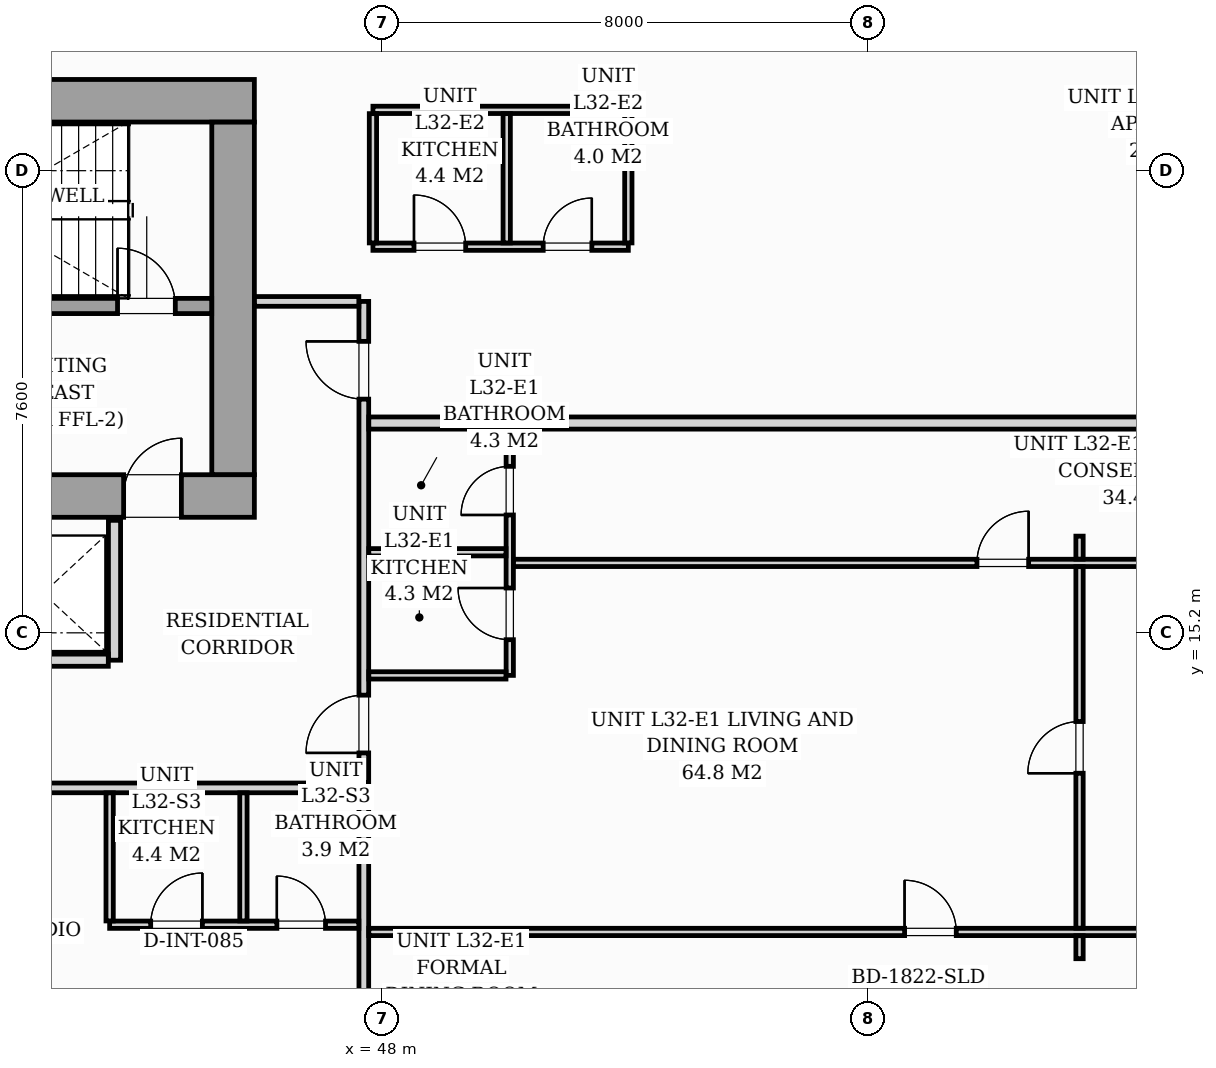
"""IFC4 building model, lengths in metres.
Left out: names, types, materials, properties, quantities, classifications, styles, units other than length and angle.
Written with IfcOpenShell. Run it as: python <this file> out.ifc"""

import sys

from ifc_helpers import new_model, si_unit, direction, frame, frame_2d, origin, origin_2d, place, context, subcontext, project, spatial, rectangle, i_section, extrude, source, transform, mapped, element, fill, save


model = new_model("IFC4")
c1 = context("Model", 3, precision=1e-05, world=origin(), true_north=direction((0.0, 1.0)))
c2 = subcontext(c1, "Body", "Model", "MODEL_VIEW")
j1 = project(units=[si_unit("LENGTHUNIT", "METRE"), si_unit("PLANEANGLEUNIT", "RADIAN")], contexts=[c1])
p1 = place(None, origin())
s1 = spatial("IfcSite", under=j1, at=p1, CompositionType="ELEMENT")
p2 = place(p1, origin())
s2 = spatial("IfcBuilding", under=s1, at=p2, CompositionType="ELEMENT")
p3 = place(p2, frame((0.0, 0.0, 113.0)))
s3 = spatial("IfcBuildingStorey", under=s2, at=p3, CompositionType="ELEMENT", Elevation=113.0)
m1 = source(origin(), c2, "Body", "SweptSolid", [
    extrude(i_section(OverallWidth=0.427, OverallDepth=0.483, WebThickness=0.051, FlangeThickness=0.082, FilletRadius=0.018, at=origin_2d()), origin(), (0.0, 0.0, 1.0), 3.196),
])
for number, where, z_axis, x_axis in (
    (1, (45.6, 17.4, 0.002), (0.0, 0.0, 1.0), (1.0, 0.0, 0.0)),
    (2, (45.6, 24.0, 0.002), (0.0, 0.0, 1.0), (1.0, 0.0, 0.0)),
):
    element("IfcColumn", number, at=place(p3, frame(where, z_axis=z_axis, x_axis=x_axis)), inside=s3, PredefinedType="PILASTER", context=c2, shape_type="MappedRepresentation", body=[
        mapped(m1, transform((0.0, 0.0, 0.0), scale=1.0)),
    ])
m2 = source(origin(), c2, "Body", "SweptSolid", [
    extrude(rectangle(XDim=0.9, YDim=1.1, at=origin_2d()), origin(), (0.0, 0.0, 1.0), 3.196),
])
p4 = place(p3, frame((53.085, 8.776, 0.002), z_axis=(0.0, 0.0, 1.0), x_axis=(0.995396198367, 0.09584575252, 0.0)))
e3 = element("IfcColumn", 3, at=p4, inside=s3, PredefinedType="COLUMN", context=c2, shape_type="MappedRepresentation", body=[
    mapped(m2, transform((0.0, 0.0, 0.0), scale=1.0)),
])
p5 = place(p3, frame((26.1, 17.45, 0.0), z_axis=(0.0, 0.0, 1.0), x_axis=(1.0, 0.0, 0.0)))
e4 = element("IfcWall", 4, at=p5, inside=s3, PredefinedType="SHEAR", context=c2, shape_type="SweptSolid", body=[
    extrude(rectangle(XDim=19.8, YDim=0.7, at=frame_2d((9.9, 0.0))), origin(), (0.0, 0.0, 1.0), 3.2),
])
p6 = place(p5, frame((1.05, 0.0, 0.0)))
e5 = element("IfcOpeningElement", 5, at=p6, cuts=e4, PredefinedType="OPENING", context=c2, shape_type="SweptSolid", body=[
    extrude(rectangle(XDim=0.95, YDim=2.06, at=frame_2d((0.475, 1.03))), frame((0.0, 0.36, 0.0), z_axis=(0.0, -1.0, 0.0), x_axis=(1.0, 0.0, 0.0)), (0.0, 0.0, 1.0), 0.72),
])
p7 = place(p5, frame((9.48, 0.0, 0.0)))
e6 = element("IfcOpeningElement", 6, at=p7, cuts=e4, PredefinedType="OPENING", context=c2, shape_type="SweptSolid", body=[
    extrude(rectangle(XDim=0.85, YDim=2.0, at=frame_2d((0.425, 1.0))), frame((0.0, 0.36, 0.0), z_axis=(0.0, -1.0, 0.0), x_axis=(1.0, 0.0, 0.0)), (0.0, 0.0, 1.0), 0.72),
])
p8 = place(p5, frame((17.65, 0.0, 0.0)))
e7 = element("IfcOpeningElement", 7, at=p8, cuts=e4, PredefinedType="OPENING", context=c2, shape_type="SweptSolid", body=[
    extrude(rectangle(XDim=0.95, YDim=2.06, at=frame_2d((0.475, 1.03))), frame((0.0, 0.36, 0.0), z_axis=(0.0, -1.0, 0.0), x_axis=(1.0, 0.0, 0.0)), (0.0, 0.0, 1.0), 0.72),
])
p9 = place(p3, frame((26.1, 23.95, 0.0), z_axis=(0.0, 0.0, 1.0), x_axis=(1.0, 0.0, 0.0)))
e8 = element("IfcWall", 8, at=p9, inside=s3, PredefinedType="SHEAR", context=c2, shape_type="SweptSolid", body=[
    extrude(rectangle(XDim=19.8, YDim=0.7, at=frame_2d((9.9, 0.0))), origin(), (0.0, 0.0, 1.0), 3.2),
])
p10 = place(p3, frame((45.55, 17.802, 0.0), z_axis=(0.0, 0.0, 1.0), x_axis=(0.0, 1.0, 0.0)))
e9 = element("IfcWall", 9, at=p10, inside=s3, PredefinedType="SHEAR", context=c2, shape_type="SweptSolid", body=[
    extrude(rectangle(XDim=5.796, YDim=0.7, at=frame_2d((2.898, 0.0))), origin(), (0.0, 0.0, 1.0), 3.2),
])
p11 = place(p3, frame((37.05, 20.575, 0.0), z_axis=(0.0, 0.0, 1.0), x_axis=(1.0, 0.0, 0.0)))
e10 = element("IfcWall", 10, at=p11, inside=s3, PredefinedType="SOLIDWALL", context=c2, shape_type="SweptSolid", body=[
    extrude(rectangle(XDim=8.148, YDim=0.25, at=frame_2d((4.074, 0.0))), origin(), (0.0, 0.0, 1.0), 3.2),
])
p12 = place(p11, frame((6.6, 0.0, 0.0)))
e11 = element("IfcOpeningElement", 11, at=p12, cuts=e10, PredefinedType="OPENING", context=c2, shape_type="SweptSolid", body=[
    extrude(rectangle(XDim=0.95, YDim=2.06, at=frame_2d((0.475, 1.03))), frame((0.0, 0.135, 0.0), z_axis=(0.0, -1.0, 0.0), x_axis=(1.0, 0.0, 0.0)), (0.0, 0.0, 1.0), 0.27),
])
p13 = place(p3, frame((43.6, 14.75, 0.0), z_axis=(0.0, 0.0, 1.0), x_axis=(0.0, 1.0, 0.0)))
e12 = element("IfcWall", 12, at=p13, inside=s3, PredefinedType="PARTITIONING", context=c2, shape_type="SweptSolid", body=[
    extrude(rectangle(XDim=2.3, YDim=0.2, at=frame_2d((1.15, 0.0))), origin(), (0.0, 0.0, 1.0), 2.94),
])
p14 = place(p3, frame((41.352, 14.75, 0.0), z_axis=(0.0, 0.0, 1.0), x_axis=(1.0, 0.0, 0.0)))
e13 = element("IfcWall", 13, at=p14, inside=s3, PredefinedType="PARTITIONING", context=c2, shape_type="SweptSolid", body=[
    extrude(rectangle(XDim=2.146, YDim=0.2, at=frame_2d((1.073, 0.0))), origin(), (0.0, 0.0, 1.0), 2.94),
])
p15 = place(p3, frame((21.5, 12.65, 0.0), z_axis=(0.0, 0.0, 1.0), x_axis=(1.0, 0.0, 0.0)))
e14 = element("IfcWall", 14, at=p15, inside=s3, PredefinedType="PARTITIONING", context=c2, shape_type="SweptSolid", body=[
    extrude(rectangle(XDim=26.2, YDim=0.16, at=frame_2d((13.1, 0.0))), origin(), (0.0, 0.0, 1.0), 2.94),
])
p16 = place(p15, frame((5.927, 0.0, 0.0)))
e15 = element("IfcOpeningElement", 15, at=p16, cuts=e14, PredefinedType="OPENING", context=c2, shape_type="SweptSolid", body=[
    extrude(rectangle(XDim=0.95, YDim=2.06, at=frame_2d((0.475, 1.03))), frame((0.0, 0.09, 0.0), z_axis=(0.0, -1.0, 0.0), x_axis=(1.0, 0.0, 0.0)), (0.0, 0.0, 1.0), 0.18),
])
p17 = place(p15, frame((10.575, 0.0, 0.0)))
e16 = element("IfcOpeningElement", 16, at=p17, cuts=e14, PredefinedType="OPENING", context=c2, shape_type="SweptSolid", body=[
    extrude(rectangle(XDim=0.95, YDim=2.06, at=frame_2d((0.475, 1.03))), frame((0.0, 0.09, 0.0), z_axis=(0.0, -1.0, 0.0), x_axis=(1.0, 0.0, 0.0)), (0.0, 0.0, 1.0), 0.18),
])
p18 = place(p15, frame((19.322, 0.0, 0.0)))
e17 = element("IfcOpeningElement", 17, at=p18, cuts=e14, PredefinedType="OPENING", context=c2, shape_type="SweptSolid", body=[
    extrude(rectangle(XDim=0.95, YDim=2.06, at=frame_2d((0.475, 1.03))), frame((0.0, 0.09, 0.0), z_axis=(0.0, -1.0, 0.0), x_axis=(1.0, 0.0, 0.0)), (0.0, 0.0, 1.0), 0.18),
])
p19 = place(p3, frame((47.7, 7.153, 0.0), z_axis=(0.0, 0.0, 1.0), x_axis=(0.0, 1.0, 0.0)))
e18 = element("IfcWall", 18, at=p19, inside=s3, PredefinedType="PARTITIONING", context=c2, shape_type="SweptSolid", body=[
    extrude(rectangle(XDim=5.416, YDim=0.16, at=frame_2d((2.708, 0.0))), origin(), (0.0, 0.0, 1.0), 2.94),
])
p20 = place(p3, frame((47.7, 12.732, 0.0), z_axis=(0.0, 0.0, 1.0), x_axis=(0.0, 1.0, 0.0)))
e19 = element("IfcWall", 19, at=p20, inside=s3, PredefinedType="PARTITIONING", context=c2, shape_type="SweptSolid", body=[
    extrude(rectangle(XDim=7.918, YDim=0.16, at=frame_2d((3.959, 0.0))), origin(), (0.0, 0.0, 1.0), 2.94),
])
p21 = place(p20, frame((0.493, 0.0, 0.0)))
e20 = element("IfcOpeningElement", 20, at=p21, cuts=e19, PredefinedType="OPENING", context=c2, shape_type="SweptSolid", body=[
    extrude(rectangle(XDim=0.95, YDim=2.06, at=frame_2d((0.475, 1.03))), frame((0.0, 0.09, 0.0), z_axis=(0.0, -1.0, 0.0), x_axis=(1.0, 0.0, 0.0)), (0.0, 0.0, 1.0), 0.18),
])
p22 = place(p20, frame((6.311, 0.0, 0.0)))
e21 = element("IfcOpeningElement", 21, at=p22, cuts=e19, PredefinedType="OPENING", context=c2, shape_type="SweptSolid", body=[
    extrude(rectangle(XDim=0.95, YDim=2.06, at=frame_2d((0.475, 1.03))), frame((0.0, 0.09, 0.0), z_axis=(0.0, -1.0, 0.0), x_axis=(1.0, 0.0, 0.0)), (0.0, 0.0, 1.0), 0.18),
])
p23 = place(p3, frame((45.902, 20.65, 0.0), z_axis=(0.0, 0.0, 1.0), x_axis=(1.0, 0.0, 0.0)))
e22 = element("IfcWall", 22, at=p23, inside=s3, PredefinedType="PARTITIONING", context=c2, shape_type="SweptSolid", body=[
    extrude(rectangle(XDim=1.716, YDim=0.16, at=frame_2d((0.858, 0.0))), origin(), (0.0, 0.0, 1.0), 2.94),
])
p24 = place(p3, frame((43.52, 10.4, 0.0), z_axis=(0.0, 0.0, 1.0), x_axis=(1.0, 0.0, 0.0)))
e23 = element("IfcWall", 23, at=p24, inside=s3, PredefinedType="PARTITIONING", context=c2, shape_type="SweptSolid", body=[
    extrude(rectangle(XDim=4.098, YDim=0.12, at=frame_2d((2.049, 0.0))), origin(), (0.0, 0.0, 1.0), 2.94),
])
p25 = place(p24, frame((0.675, 0.0, 0.0)))
e24 = element("IfcOpeningElement", 24, at=p25, cuts=e23, PredefinedType="OPENING", context=c2, shape_type="SweptSolid", body=[
    extrude(rectangle(XDim=0.85, YDim=2.05, at=frame_2d((0.425, 1.025))), frame((0.0, 0.07, 0.0), z_axis=(0.0, -1.0, 0.0), x_axis=(1.0, 0.0, 0.0)), (0.0, 0.0, 1.0), 0.14),
])
p26 = place(p24, frame((2.75, 0.0, 0.0)))
e25 = element("IfcOpeningElement", 25, at=p26, cuts=e23, PredefinedType="OPENING", context=c2, shape_type="SweptSolid", body=[
    extrude(rectangle(XDim=0.8, YDim=2.02, at=frame_2d((0.4, 1.01))), frame((0.0, 0.07, 0.0), z_axis=(0.0, -1.0, 0.0), x_axis=(1.0, 0.0, 0.0)), (0.0, 0.0, 1.0), 0.14),
])
for number, where, z_axis, x_axis in (
    (26, (43.52, 10.462, 0.0), (0.0, 0.0, 1.0), (0.0, 1.0, 0.0)),
    (27, (45.72, 10.462, 0.0), (0.0, 0.0, 1.0), (0.0, 1.0, 0.0)),
):
    element("IfcWall", number, at=place(p3, frame(where, z_axis=z_axis, x_axis=x_axis)), inside=s3, PredefinedType="PARTITIONING", context=c2, shape_type="SweptSolid", body=[
        extrude(rectangle(XDim=2.106, YDim=0.12, at=frame_2d((1.053, 0.0))), origin(), (0.0, 0.0, 1.0), 2.94),
    ])
p27 = place(p3, frame((47.782, 18.65, 0.0), z_axis=(0.0, 0.0, 1.0), x_axis=(1.0, 0.0, 0.0)))
e28 = element("IfcWall", 28, at=p27, inside=s3, PredefinedType="PARTITIONING", context=c2, shape_type="SweptSolid", body=[
    extrude(rectangle(XDim=21.049, YDim=0.2, at=frame_2d((10.525, 0.0))), origin(), (0.0, 0.0, 1.0), 2.063),
])
p28 = place(p3, frame((50.1, 14.5, 0.0), z_axis=(0.0, 0.0, 1.0), x_axis=(0.0, 1.0, 0.0)))
e29 = element("IfcWall", 29, at=p28, inside=s3, PredefinedType="PARTITIONING", context=c2, shape_type="SweptSolid", body=[
    extrude(rectangle(XDim=4.048, YDim=0.12, at=frame_2d((2.024, 0.0))), origin(), (0.0, 0.0, 1.0), 2.94),
])
p29 = place(p28, frame((0.587, 0.0, 0.0)))
e30 = element("IfcOpeningElement", 30, at=p29, cuts=e29, PredefinedType="OPENING", context=c2, shape_type="SweptSolid", body=[
    extrude(rectangle(XDim=0.85, YDim=2.05, at=frame_2d((0.425, 1.025))), frame((0.0, 0.07, 0.0), z_axis=(0.0, -1.0, 0.0), x_axis=(1.0, 0.0, 0.0)), (0.0, 0.0, 1.0), 0.14),
])
p30 = place(p28, frame((2.638, 0.0, 0.0)))
e31 = element("IfcOpeningElement", 31, at=p30, cuts=e29, PredefinedType="OPENING", context=c2, shape_type="SweptSolid", body=[
    extrude(rectangle(XDim=0.8, YDim=2.02, at=frame_2d((0.4, 1.01))), frame((0.0, 0.07, 0.0), z_axis=(0.0, -1.0, 0.0), x_axis=(1.0, 0.0, 0.0)), (0.0, 0.0, 1.0), 0.14),
])
for number, where, z_axis, x_axis in (
    (32, (47.782, 16.525, 0.0), (0.0, 0.0, 1.0), (1.0, 0.0, 0.0)),
    (33, (47.782, 14.5, 0.0), (0.0, 0.0, 1.0), (1.0, 0.0, 0.0)),
):
    element("IfcWall", number, at=place(p3, frame(where, z_axis=z_axis, x_axis=x_axis)), inside=s3, PredefinedType="PARTITIONING", context=c2, shape_type="SweptSolid", body=[
        extrude(rectangle(XDim=2.256, YDim=0.12, at=frame_2d((1.128, 0.0))), origin(), (0.0, 0.0, 1.0), 2.94),
    ])
p31 = place(p3, frame((47.782, 10.281, 0.0), z_axis=(0.0, 0.0, 1.0), x_axis=(1.0, 0.0, 0.0)))
e34 = element("IfcWall", 34, at=p31, inside=s3, PredefinedType="PARTITIONING", context=c2, shape_type="SweptSolid", body=[
    extrude(rectangle(XDim=18.472, YDim=0.12, at=frame_2d((9.236, 0.0))), origin(), (0.0, 0.0, 1.0), 2.94),
])
p32 = place(p31, frame((8.811, 0.0, 0.0)))
e35 = element("IfcOpeningElement", 35, at=p32, cuts=e34, PredefinedType="OPENING", context=c2, shape_type="SweptSolid", body=[
    extrude(rectangle(XDim=0.85, YDim=2.05, at=frame_2d((0.425, 1.025))), frame((0.0, 0.07, 0.0), z_axis=(0.0, -1.0, 0.0), x_axis=(1.0, 0.0, 0.0)), (0.0, 0.0, 1.0), 0.14),
])
p33 = place(p3, frame((50.162, 16.35, 0.0), z_axis=(0.0, 0.0, 1.0), x_axis=(1.0, 0.0, 0.0)))
e36 = element("IfcWall", 36, at=p33, inside=s3, PredefinedType="PARTITIONING", context=c2, shape_type="SweptSolid", body=[
    extrude(rectangle(XDim=16.092, YDim=0.12, at=frame_2d((8.046, 0.0))), origin(), (0.0, 0.0, 1.0), 2.94),
])
p34 = place(p33, frame((7.621, 0.0, 0.0)))
e37 = element("IfcOpeningElement", 37, at=p34, cuts=e36, PredefinedType="OPENING", context=c2, shape_type="SweptSolid", body=[
    extrude(rectangle(XDim=0.85, YDim=2.05, at=frame_2d((0.425, 1.025))), frame((0.0, 0.07, 0.0), z_axis=(0.0, -1.0, 0.0), x_axis=(1.0, 0.0, 0.0)), (0.0, 0.0, 1.0), 0.14),
])
p35 = place(p3, frame((59.47, 9.841, 0.0), z_axis=(0.0, 0.0, 1.0), x_axis=(0.0, 1.0, 0.0)))
e38 = element("IfcWall", 38, at=p35, inside=s3, PredefinedType="PARTITIONING", context=c2, shape_type="SweptSolid", body=[
    extrude(rectangle(XDim=0.378, YDim=0.12, at=frame_2d((0.189, 0.0))), origin(), (0.0, 0.0, 1.0), 2.94),
])
p36 = place(p3, frame((59.47, 10.343, 0.0), z_axis=(0.0, 0.0, 1.0), x_axis=(0.0, 1.0, 0.0)))
e39 = element("IfcWall", 39, at=p36, inside=s3, PredefinedType="PARTITIONING", context=c2, shape_type="SweptSolid", body=[
    extrude(rectangle(XDim=5.945, YDim=0.12, at=frame_2d((2.973, 0.0))), origin(), (0.0, 0.0, 1.0), 2.94),
])
p37 = place(p36, frame((2.548, 0.0, 0.0)))
e40 = element("IfcOpeningElement", 40, at=p37, cuts=e39, PredefinedType="OPENING", context=c2, shape_type="SweptSolid", body=[
    extrude(rectangle(XDim=0.85, YDim=2.05, at=frame_2d((0.425, 1.025))), frame((0.0, 0.07, 0.0), z_axis=(0.0, -1.0, 0.0), x_axis=(1.0, 0.0, 0.0)), (0.0, 0.0, 1.0), 0.14),
])
p38 = place(p3, frame((59.47, 16.412, 0.0), z_axis=(0.0, 0.0, 1.0), x_axis=(0.0, 1.0, 0.0)))
e41 = element("IfcWall", 41, at=p38, inside=s3, PredefinedType="PARTITIONING", context=c2, shape_type="SweptSolid", body=[
    extrude(rectangle(XDim=0.378, YDim=0.12, at=frame_2d((0.189, 0.0))), origin(), (0.0, 0.0, 1.0), 2.94),
])
p39 = place(p3, frame((47.85, 21.55, 0.0), z_axis=(0.0, 0.0, 1.0), x_axis=(1.0, 0.0, 0.0)))
e42 = element("IfcWall", 42, at=p39, inside=s3, PredefinedType="PARTITIONING", context=c2, shape_type="SweptSolid", body=[
    extrude(rectangle(XDim=4.2, YDim=0.12, at=frame_2d((2.1, 0.0))), origin(), (0.0, 0.0, 1.0), 2.94),
])
p40 = place(p39, frame((0.675, 0.0, 0.0)))
e43 = element("IfcOpeningElement", 43, at=p40, cuts=e42, PredefinedType="OPENING", context=c2, shape_type="SweptSolid", body=[
    extrude(rectangle(XDim=0.85, YDim=2.05, at=frame_2d((0.425, 1.025))), frame((0.0, 0.07, 0.0), z_axis=(0.0, -1.0, 0.0), x_axis=(1.0, 0.0, 0.0)), (0.0, 0.0, 1.0), 0.14),
])
p41 = place(p39, frame((2.8, 0.0, 0.0)))
e44 = element("IfcOpeningElement", 44, at=p41, cuts=e42, PredefinedType="OPENING", context=c2, shape_type="SweptSolid", body=[
    extrude(rectangle(XDim=0.8, YDim=2.02, at=frame_2d((0.4, 1.01))), frame((0.0, 0.07, 0.0), z_axis=(0.0, -1.0, 0.0), x_axis=(1.0, 0.0, 0.0)), (0.0, 0.0, 1.0), 0.14),
])
p42 = place(p3, frame((47.85, 23.8, 0.0), z_axis=(0.0, 0.0, 1.0), x_axis=(1.0, 0.0, 0.0)))
e45 = element("IfcWall", 45, at=p42, inside=s3, PredefinedType="PARTITIONING", context=c2, shape_type="SweptSolid", body=[
    extrude(rectangle(XDim=4.2, YDim=0.12, at=frame_2d((2.1, 0.0))), origin(), (0.0, 0.0, 1.0), 2.94),
])
for number, where, z_axis, x_axis in (
    (46, (47.85, 21.612, 0.0), (0.0, 0.0, 1.0), (0.0, 1.0, 0.0)),
    (47, (50.05, 21.612, 0.0), (0.0, 0.0, 1.0), (0.0, 1.0, 0.0)),
    (48, (52.05, 21.612, 0.0), (0.0, 0.0, 1.0), (0.0, 1.0, 0.0)),
):
    element("IfcWall", number, at=place(p3, frame(where, z_axis=z_axis, x_axis=x_axis)), inside=s3, PredefinedType="PARTITIONING", context=c2, shape_type="SweptSolid", body=[
        extrude(rectangle(XDim=2.126, YDim=0.12, at=frame_2d((1.063, 0.0))), origin(), (0.0, 0.0, 1.0), 2.94),
    ])
m3 = source(origin(), c2, "Body", "SweptSolid", [
    extrude(rectangle(XDim=0.95, YDim=2.06, at=frame_2d((0.475, 1.03))), frame((0.0, 0.025, 0.0), z_axis=(0.0, -1.0, 0.0), x_axis=(1.0, 0.0, 0.0)), (0.0, 0.0, 1.0), 0.05),
])
p43 = place(p8, origin())
e49 = element("IfcDoor", 49, at=p43, inside=s3, OperationType="SINGLE_SWING_RIGHT", PredefinedType="DOOR", context=c2, shape_type="MappedRepresentation", body=[
    mapped(m3, transform((0.0, 0.0, 0.0), scale=1.0)),
])
fill(e7, e49)
p44 = place(p12, origin())
e50 = element("IfcDoor", 50, at=p44, inside=s3, OperationType="SINGLE_SWING_LEFT", PredefinedType="DOOR", context=c2, shape_type="MappedRepresentation", body=[
    mapped(m3, transform((0.0, 0.0, 0.0), scale=1.0)),
])
fill(e11, e50)
m4 = source(origin(), c2, "Body", "SweptSolid", [
    extrude(rectangle(XDim=0.85, YDim=2.05, at=frame_2d((0.425, 1.025))), frame((0.0, 0.025, 0.0), z_axis=(0.0, -1.0, 0.0), x_axis=(1.0, 0.0, 0.0)), (0.0, 0.0, 1.0), 0.05),
])
p45 = place(p25, origin())
e51 = element("IfcDoor", 51, at=p45, inside=s3, OperationType="SINGLE_SWING_RIGHT", PredefinedType="DOOR", context=c2, shape_type="MappedRepresentation", body=[
    mapped(m4, transform((0.0, 0.0, 0.0), scale=1.0)),
])
fill(e24, e51)
m5 = source(origin(), c2, "Body", "SweptSolid", [
    extrude(rectangle(XDim=0.8, YDim=2.02, at=frame_2d((0.4, 1.01))), frame((0.0, 0.025, 0.0), z_axis=(0.0, -1.0, 0.0), x_axis=(1.0, 0.0, 0.0)), (0.0, 0.0, 1.0), 0.05),
])
p46 = place(p26, origin())
e52 = element("IfcDoor", 52, at=p46, inside=s3, OperationType="SINGLE_SWING_LEFT", PredefinedType="DOOR", context=c2, shape_type="MappedRepresentation", body=[
    mapped(m5, transform((0.0, 0.0, 0.0), scale=1.0)),
])
fill(e25, e52)
m6 = source(origin(), c2, "Body", "SweptSolid", [
    extrude(rectangle(XDim=0.95, YDim=2.06, at=frame_2d((0.475, 1.03))), frame((0.0, 0.025, 0.0), z_axis=(0.0, -1.0, 0.0), x_axis=(1.0, 0.0, 0.0)), (0.0, 0.0, 1.0), 0.05),
])
p47 = place(p21, origin())
e53 = element("IfcDoor", 53, at=p47, inside=s3, OperationType="SINGLE_SWING_LEFT", PredefinedType="DOOR", context=c2, shape_type="MappedRepresentation", body=[
    mapped(m6, transform((0.0, 0.0, 0.0), scale=1.0)),
])
fill(e20, e53)
p48 = place(p29, origin())
e54 = element("IfcDoor", 54, at=p48, inside=s3, OperationType="SINGLE_SWING_RIGHT", PredefinedType="DOOR", context=c2, shape_type="MappedRepresentation", body=[
    mapped(m4, transform((0.0, 0.0, 0.0), scale=1.0)),
])
fill(e30, e54)
p49 = place(p30, origin())
e55 = element("IfcDoor", 55, at=p49, inside=s3, OperationType="SINGLE_SWING_LEFT", PredefinedType="DOOR", context=c2, shape_type="MappedRepresentation", body=[
    mapped(m5, transform((0.0, 0.0, 0.0), scale=1.0)),
])
fill(e31, e55)
p50 = place(p32, origin())
e56 = element("IfcDoor", 56, at=p50, inside=s3, OperationType="SINGLE_SWING_LEFT", PredefinedType="DOOR", context=c2, shape_type="MappedRepresentation", body=[
    mapped(m4, transform((0.0, 0.0, 0.0), scale=1.0)),
])
fill(e35, e56)
p51 = place(p34, origin())
e57 = element("IfcDoor", 57, at=p51, inside=s3, OperationType="SINGLE_SWING_RIGHT", PredefinedType="DOOR", context=c2, shape_type="MappedRepresentation", body=[
    mapped(m4, transform((0.0, 0.0, 0.0), scale=1.0)),
])
fill(e37, e57)
p52 = place(p37, origin())
e58 = element("IfcDoor", 58, at=p52, inside=s3, OperationType="SINGLE_SWING_LEFT", PredefinedType="DOOR", context=c2, shape_type="MappedRepresentation", body=[
    mapped(m4, transform((0.0, 0.0, 0.0), scale=1.0)),
])
fill(e40, e58)
p53 = place(p22, origin())
e59 = element("IfcDoor", 59, at=p53, inside=s3, OperationType="SINGLE_SWING_RIGHT", PredefinedType="DOOR", context=c2, shape_type="MappedRepresentation", body=[
    mapped(m6, transform((0.0, 0.0, 0.0), scale=1.0)),
])
fill(e21, e59)
p54 = place(p40, origin())
e60 = element("IfcDoor", 60, at=p54, inside=s3, OperationType="SINGLE_SWING_LEFT", PredefinedType="DOOR", context=c2, shape_type="MappedRepresentation", body=[
    mapped(m4, transform((0.0, 0.0, 0.0), scale=1.0)),
])
fill(e43, e60)
p55 = place(p41, origin())
e61 = element("IfcDoor", 61, at=p55, inside=s3, OperationType="SINGLE_SWING_RIGHT", PredefinedType="DOOR", context=c2, shape_type="MappedRepresentation", body=[
    mapped(m5, transform((0.0, 0.0, 0.0), scale=1.0)),
])
fill(e44, e61)
save(model, sys.argv[1])
